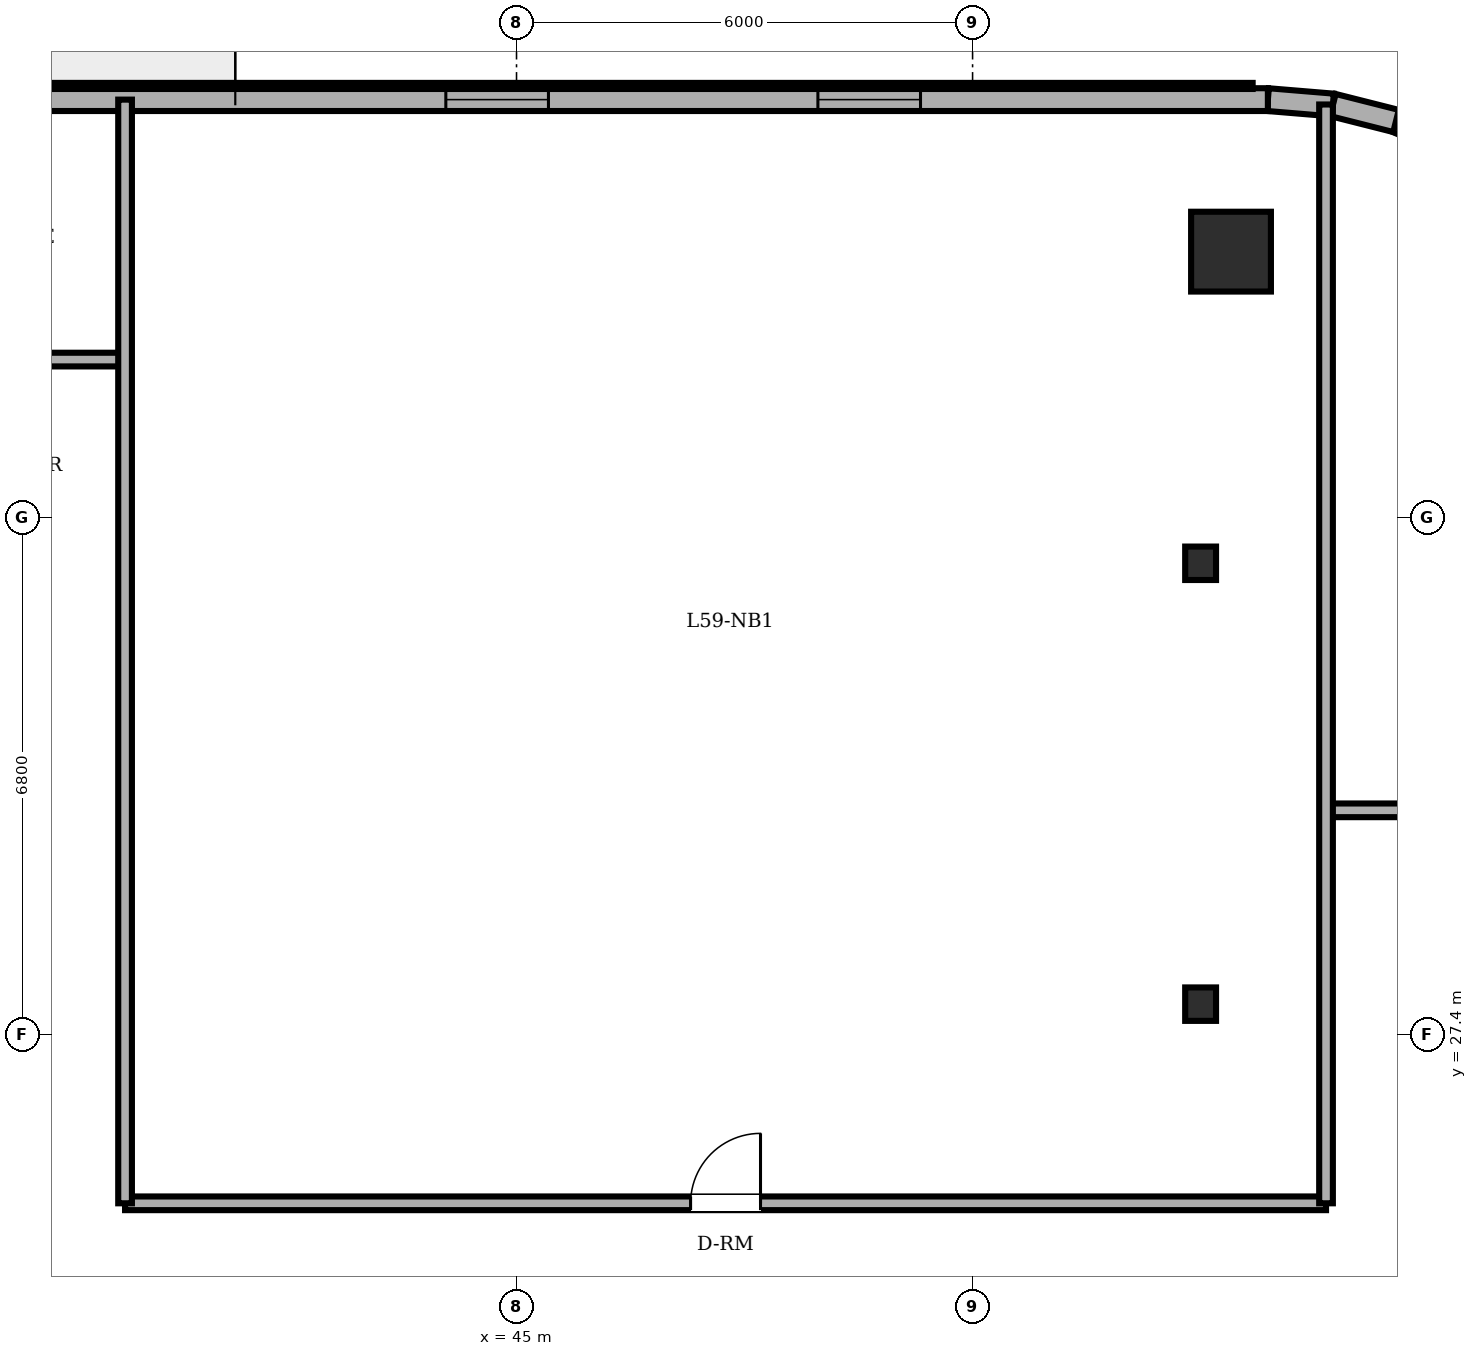
"""IFC4 building model, lengths in metres.
Left out: names, types, materials, properties, quantities, classifications, styles, units other than length and angle.
Written with IfcOpenShell. Run it as: python <this file> out.ifc"""

import sys

from ifc_helpers import new_model, si_unit, direction, frame, frame_2d, origin, origin_2d, place, context, subcontext, project, spatial, rectangle, circle, i_section, extrude, element, fill, save


model = new_model("IFC4")
c1 = context("Model", 3, precision=1e-05, world=origin(), true_north=direction((0.0, 1.0)))
c2 = subcontext(c1, "Body", "Model", "MODEL_VIEW")
j1 = project(units=[si_unit("LENGTHUNIT", "METRE"), si_unit("PLANEANGLEUNIT", "RADIAN")], contexts=[c1])
p1 = place(None, origin())
s1 = spatial("IfcSite", under=j1, at=p1, CompositionType="ELEMENT")
p2 = place(p1, origin())
s2 = spatial("IfcBuilding", under=s1, at=p2, CompositionType="ELEMENT")
p3 = place(p2, frame((0.0, 0.0, 226.5)))
s3 = spatial("IfcBuildingStorey", under=s2, at=p3, CompositionType="ELEMENT", Elevation=226.5)
p4 = place(p3, frame((54.4, 37.7, 0.0), z_axis=(0.0, 0.0, 1.0), x_axis=(1.0, 0.0, 0.0)))
e1 = element("IfcColumn", 1, at=p4, inside=s3, PredefinedType="COLUMN", context=c2, shape_type="SweptSolid", body=[
    extrude(circle(Radius=0.525, at=origin_2d()), origin(), (0.0, 0.0, 1.0), 3.6),
])
for number, where, z_axis, x_axis in (
    (2, (54.0, 27.8, 0.0), (0.0, 0.0, 1.0), (1.0, 0.0, 0.0)),
    (3, (54.0, 33.6, 0.0), (0.0, 0.0, 1.0), (1.0, 0.0, 0.0)),
):
    element("IfcColumn", number, at=place(p3, frame(where, z_axis=z_axis, x_axis=x_axis)), inside=s3, PredefinedType="COLUMN", context=c2, shape_type="SweptSolid", body=[
        extrude(i_section(OverallWidth=0.406, OverallDepth=0.44, WebThickness=0.024, FlangeThickness=0.039, FilletRadius=0.015, at=origin_2d()), origin(), (0.0, 0.0, 1.0), 3.6),
    ])
p5 = place(p3, frame((57.357, 39.075, 0.0), z_axis=(0.0, 0.0, 1.0), x_axis=(-0.916085473636, 0.400983048261, 0.0)))
e4 = element("IfcWall", 4, at=p5, inside=s3, PredefinedType="SOLIDWALL", context=c2, shape_type="SweptSolid", body=[
    extrude(rectangle(XDim=0.858, YDim=0.3, at=frame_2d((0.429, 0.0))), origin(), (0.0, 0.0, 1.0), 3.4),
])
p6 = place(p3, frame((56.571, 39.419, 0.0), z_axis=(0.0, 0.0, 1.0), x_axis=(-0.969536346338, 0.244947490555, 0.0)))
e5 = element("IfcWall", 5, at=p6, inside=s3, PredefinedType="SOLIDWALL", context=c2, shape_type="SweptSolid", body=[
    extrude(rectangle(XDim=0.857, YDim=0.3, at=frame_2d((0.429, 0.0))), origin(), (0.0, 0.0, 1.0), 3.4),
])
p7 = place(p3, frame((55.74, 39.629, 0.0), z_axis=(0.0, 0.0, 1.0), x_axis=(-0.996565355958, 0.082809971041, 0.0)))
e6 = element("IfcWall", 6, at=p7, inside=s3, PredefinedType="SOLIDWALL", context=c2, shape_type="SweptSolid", body=[
    extrude(rectangle(XDim=0.858, YDim=0.3, at=frame_2d((0.429, 0.0))), origin(), (0.0, 0.0, 1.0), 3.4),
])
p8 = place(p3, frame((54.885, 39.7, 0.0), z_axis=(0.0, 0.0, 1.0), x_axis=(-1.0, 0.0, 0.0)))
e7 = element("IfcWall", 7, at=p8, inside=s3, PredefinedType="SOLIDWALL", context=c2, shape_type="SweptSolid", body=[
    extrude(rectangle(XDim=32.485, YDim=0.3, at=frame_2d((16.243, 0.0))), origin(), (0.0, 0.0, 1.0), 3.4),
])
p9 = place(p8, frame((23.61, 0.0, 0.0)))
e8 = element("IfcOpeningElement", 8, at=p9, cuts=e7, PredefinedType="OPENING", context=c2, shape_type="SweptSolid", body=[
    extrude(rectangle(XDim=0.95, YDim=2.2, at=frame_2d((0.475, 1.1))), frame((0.0, 0.16, 0.0), z_axis=(0.0, -1.0, 0.0), x_axis=(1.0, 0.0, 0.0)), (0.0, 0.0, 1.0), 0.32),
])
p10 = place(p8, frame((4.57, 0.0, 0.85)))
e9 = element("IfcOpeningElement", 9, at=p10, cuts=e7, PredefinedType="OPENING", context=c2, shape_type="SweptSolid", body=[
    extrude(rectangle(XDim=1.35, YDim=1.55, at=frame_2d((0.675, 0.775))), frame((0.0, 0.16, 0.0), z_axis=(0.0, -1.0, 0.0), x_axis=(1.0, 0.0, 0.0)), (0.0, 0.0, 1.0), 0.32),
])
p11 = place(p8, frame((9.465, 0.0, 0.85)))
e10 = element("IfcOpeningElement", 10, at=p11, cuts=e7, PredefinedType="OPENING", context=c2, shape_type="SweptSolid", body=[
    extrude(rectangle(XDim=1.35, YDim=1.55, at=frame_2d((0.675, 0.775))), frame((0.0, 0.16, 0.0), z_axis=(0.0, -1.0, 0.0), x_axis=(1.0, 0.0, 0.0)), (0.0, 0.0, 1.0), 0.32),
])
p12 = place(p8, frame((16.577, 0.0, 0.85)))
e11 = element("IfcOpeningElement", 11, at=p12, cuts=e7, PredefinedType="OPENING", context=c2, shape_type="SweptSolid", body=[
    extrude(rectangle(XDim=1.35, YDim=1.55, at=frame_2d((0.675, 0.775))), frame((0.0, 0.16, 0.0), z_axis=(0.0, -1.0, 0.0), x_axis=(1.0, 0.0, 0.0)), (0.0, 0.0, 1.0), 0.32),
])
p13 = place(p8, frame((18.793, 0.0, 0.85)))
e12 = element("IfcOpeningElement", 12, at=p13, cuts=e7, PredefinedType="OPENING", context=c2, shape_type="SweptSolid", body=[
    extrude(rectangle(XDim=1.35, YDim=1.55, at=frame_2d((0.675, 0.775))), frame((0.0, 0.16, 0.0), z_axis=(0.0, -1.0, 0.0), x_axis=(1.0, 0.0, 0.0)), (0.0, 0.0, 1.0), 0.32),
])
p14 = place(p8, frame((26.51, 0.0, 0.85)))
e13 = element("IfcOpeningElement", 13, at=p14, cuts=e7, PredefinedType="OPENING", context=c2, shape_type="SweptSolid", body=[
    extrude(rectangle(XDim=1.35, YDim=1.55, at=frame_2d((0.675, 0.775))), frame((0.0, 0.16, 0.0), z_axis=(0.0, -1.0, 0.0), x_axis=(1.0, 0.0, 0.0)), (0.0, 0.0, 1.0), 0.32),
])
p15 = place(p8, frame((29.835, 0.0, 0.85)))
e14 = element("IfcOpeningElement", 14, at=p15, cuts=e7, PredefinedType="OPENING", context=c2, shape_type="SweptSolid", body=[
    extrude(rectangle(XDim=1.35, YDim=1.55, at=frame_2d((0.675, 0.775))), frame((0.0, 0.16, 0.0), z_axis=(0.0, -1.0, 0.0), x_axis=(1.0, 0.0, 0.0)), (0.0, 0.0, 1.0), 0.32),
])
p16 = place(p3, frame((39.85, 25.18, 0.0), z_axis=(0.0, 0.0, 1.0), x_axis=(1.0, 0.0, 0.0)))
e15 = element("IfcWall", 15, at=p16, inside=s3, PredefinedType="PARTITIONING", context=c2, shape_type="SweptSolid", body=[
    extrude(rectangle(XDim=15.8, YDim=0.18, at=frame_2d((7.9, 0.0))), origin(), (0.0, 0.0, 1.0), 3.4),
])
p17 = place(p16, frame((7.44, 0.0, 0.0)))
e16 = element("IfcOpeningElement", 16, at=p17, cuts=e15, PredefinedType="OPENING", context=c2, shape_type="SweptSolid", body=[
    extrude(rectangle(XDim=0.92, YDim=2.1, at=frame_2d((0.46, 1.05))), frame((0.0, 0.1, 0.0), z_axis=(0.0, -1.0, 0.0), x_axis=(1.0, 0.0, 0.0)), (0.0, 0.0, 1.0), 0.2),
])
p18 = place(p3, frame((55.65, 30.35, 0.0), z_axis=(0.0, 0.0, 1.0), x_axis=(1.0, 0.0, 0.0)))
e17 = element("IfcWall", 17, at=p18, inside=s3, PredefinedType="PARTITIONING", context=c2, shape_type="SweptSolid", body=[
    extrude(rectangle(XDim=12.868, YDim=0.18, at=frame_2d((6.434, 0.0))), origin(), (0.0, 0.0, 1.0), 3.4),
])
p19 = place(p18, frame((0.975, 0.0, 0.0)))
e18 = element("IfcOpeningElement", 18, at=p19, cuts=e17, PredefinedType="OPENING", context=c2, shape_type="SweptSolid", body=[
    extrude(rectangle(XDim=0.92, YDim=2.1, at=frame_2d((0.46, 1.05))), frame((0.0, 0.1, 0.0), z_axis=(0.0, -1.0, 0.0), x_axis=(1.0, 0.0, 0.0)), (0.0, 0.0, 1.0), 0.2),
])
p20 = place(p3, frame((17.677, 36.28, 0.0), z_axis=(0.0, 0.0, 1.0), x_axis=(1.0, 0.0, 0.0)))
e19 = element("IfcWall", 19, at=p20, inside=s3, PredefinedType="PARTITIONING", context=c2, shape_type="SweptSolid", body=[
    extrude(rectangle(XDim=22.173, YDim=0.18, at=frame_2d((11.086, 0.0))), origin(), (0.0, 0.0, 1.0), 3.4),
])
p21 = place(p20, frame((9.573, 0.0, 0.0)))
e20 = element("IfcOpeningElement", 20, at=p21, cuts=e19, PredefinedType="OPENING", context=c2, shape_type="SweptSolid", body=[
    extrude(rectangle(XDim=0.9, YDim=2.1, at=frame_2d((0.45, 1.05))), frame((0.0, 0.1, 0.0), z_axis=(0.0, -1.0, 0.0), x_axis=(1.0, 0.0, 0.0)), (0.0, 0.0, 1.0), 0.2),
])
p22 = place(p20, frame((13.193, 0.0, 0.0)))
e21 = element("IfcOpeningElement", 21, at=p22, cuts=e19, PredefinedType="OPENING", context=c2, shape_type="SweptSolid", body=[
    extrude(rectangle(XDim=0.86, YDim=2.1, at=frame_2d((0.43, 1.05))), frame((0.0, 0.1, 0.0), z_axis=(0.0, -1.0, 0.0), x_axis=(1.0, 0.0, 0.0)), (0.0, 0.0, 1.0), 0.2),
])
p23 = place(p20, frame((4.063, 0.0, 0.0)))
e22 = element("IfcOpeningElement", 22, at=p23, cuts=e19, PredefinedType="OPENING", context=c2, shape_type="SweptSolid", body=[
    extrude(rectangle(XDim=0.92, YDim=2.1, at=frame_2d((0.46, 1.05))), frame((0.0, 0.1, 0.0), z_axis=(0.0, -1.0, 0.0), x_axis=(1.0, 0.0, 0.0)), (0.0, 0.0, 1.0), 0.2),
])
p24 = place(p20, frame((18.128, 0.0, 0.0)))
e23 = element("IfcOpeningElement", 23, at=p24, cuts=e19, PredefinedType="OPENING", context=c2, shape_type="SweptSolid", body=[
    extrude(rectangle(XDim=0.92, YDim=2.1, at=frame_2d((0.46, 1.05))), frame((0.0, 0.1, 0.0), z_axis=(0.0, -1.0, 0.0), x_axis=(1.0, 0.0, 0.0)), (0.0, 0.0, 1.0), 0.2),
])
p25 = place(p3, frame((39.85, 25.18, 0.0), z_axis=(0.0, 0.0, 1.0), x_axis=(0.0, 1.0, 0.0)))
e24 = element("IfcWall", 24, at=p25, inside=s3, PredefinedType="PARTITIONING", context=c2, shape_type="SweptSolid", body=[
    extrude(rectangle(XDim=14.52, YDim=0.18, at=frame_2d((7.26, 0.0))), origin(), (0.0, 0.0, 1.0), 3.4),
])
p26 = place(p3, frame((55.65, 25.18, 0.0), z_axis=(0.0, 0.0, 1.0), x_axis=(0.0, 1.0, 0.0)))
e25 = element("IfcWall", 25, at=p26, inside=s3, PredefinedType="PARTITIONING", context=c2, shape_type="SweptSolid", body=[
    extrude(rectangle(XDim=14.456, YDim=0.18, at=frame_2d((7.228, 0.0))), origin(), (0.0, 0.0, 1.0), 3.4),
])
p27 = place(p10, origin())
e26 = element("IfcWindow", 26, at=p27, inside=s3, PartitioningType="SINGLE_PANEL", PredefinedType="WINDOW", context=c2, shape_type="SweptSolid", body=[
    extrude(rectangle(XDim=1.35, YDim=1.55, at=frame_2d((0.675, 0.775))), frame((0.0, 0.03, 0.0), z_axis=(0.0, -1.0, 0.0), x_axis=(1.0, 0.0, 0.0)), (0.0, 0.0, 1.0), 0.06),
])
fill(e9, e26)
p28 = place(p11, origin())
e27 = element("IfcWindow", 27, at=p28, inside=s3, PartitioningType="SINGLE_PANEL", PredefinedType="WINDOW", context=c2, shape_type="SweptSolid", body=[
    extrude(rectangle(XDim=1.35, YDim=1.55, at=frame_2d((0.675, 0.775))), frame((0.0, 0.03, 0.0), z_axis=(0.0, -1.0, 0.0), x_axis=(1.0, 0.0, 0.0)), (0.0, 0.0, 1.0), 0.06),
])
fill(e10, e27)
p29 = place(p17, origin())
e28 = element("IfcDoor", 28, at=p29, inside=s3, OperationType="SINGLE_SWING_RIGHT", PredefinedType="DOOR", context=c2, shape_type="SweptSolid", body=[
    extrude(rectangle(XDim=0.92, YDim=2.1, at=frame_2d((0.46, 1.05))), frame((0.0, 0.025, 0.0), z_axis=(0.0, -1.0, 0.0), x_axis=(1.0, 0.0, 0.0)), (0.0, 0.0, 1.0), 0.05),
])
fill(e16, e28)
save(model, sys.argv[1])
